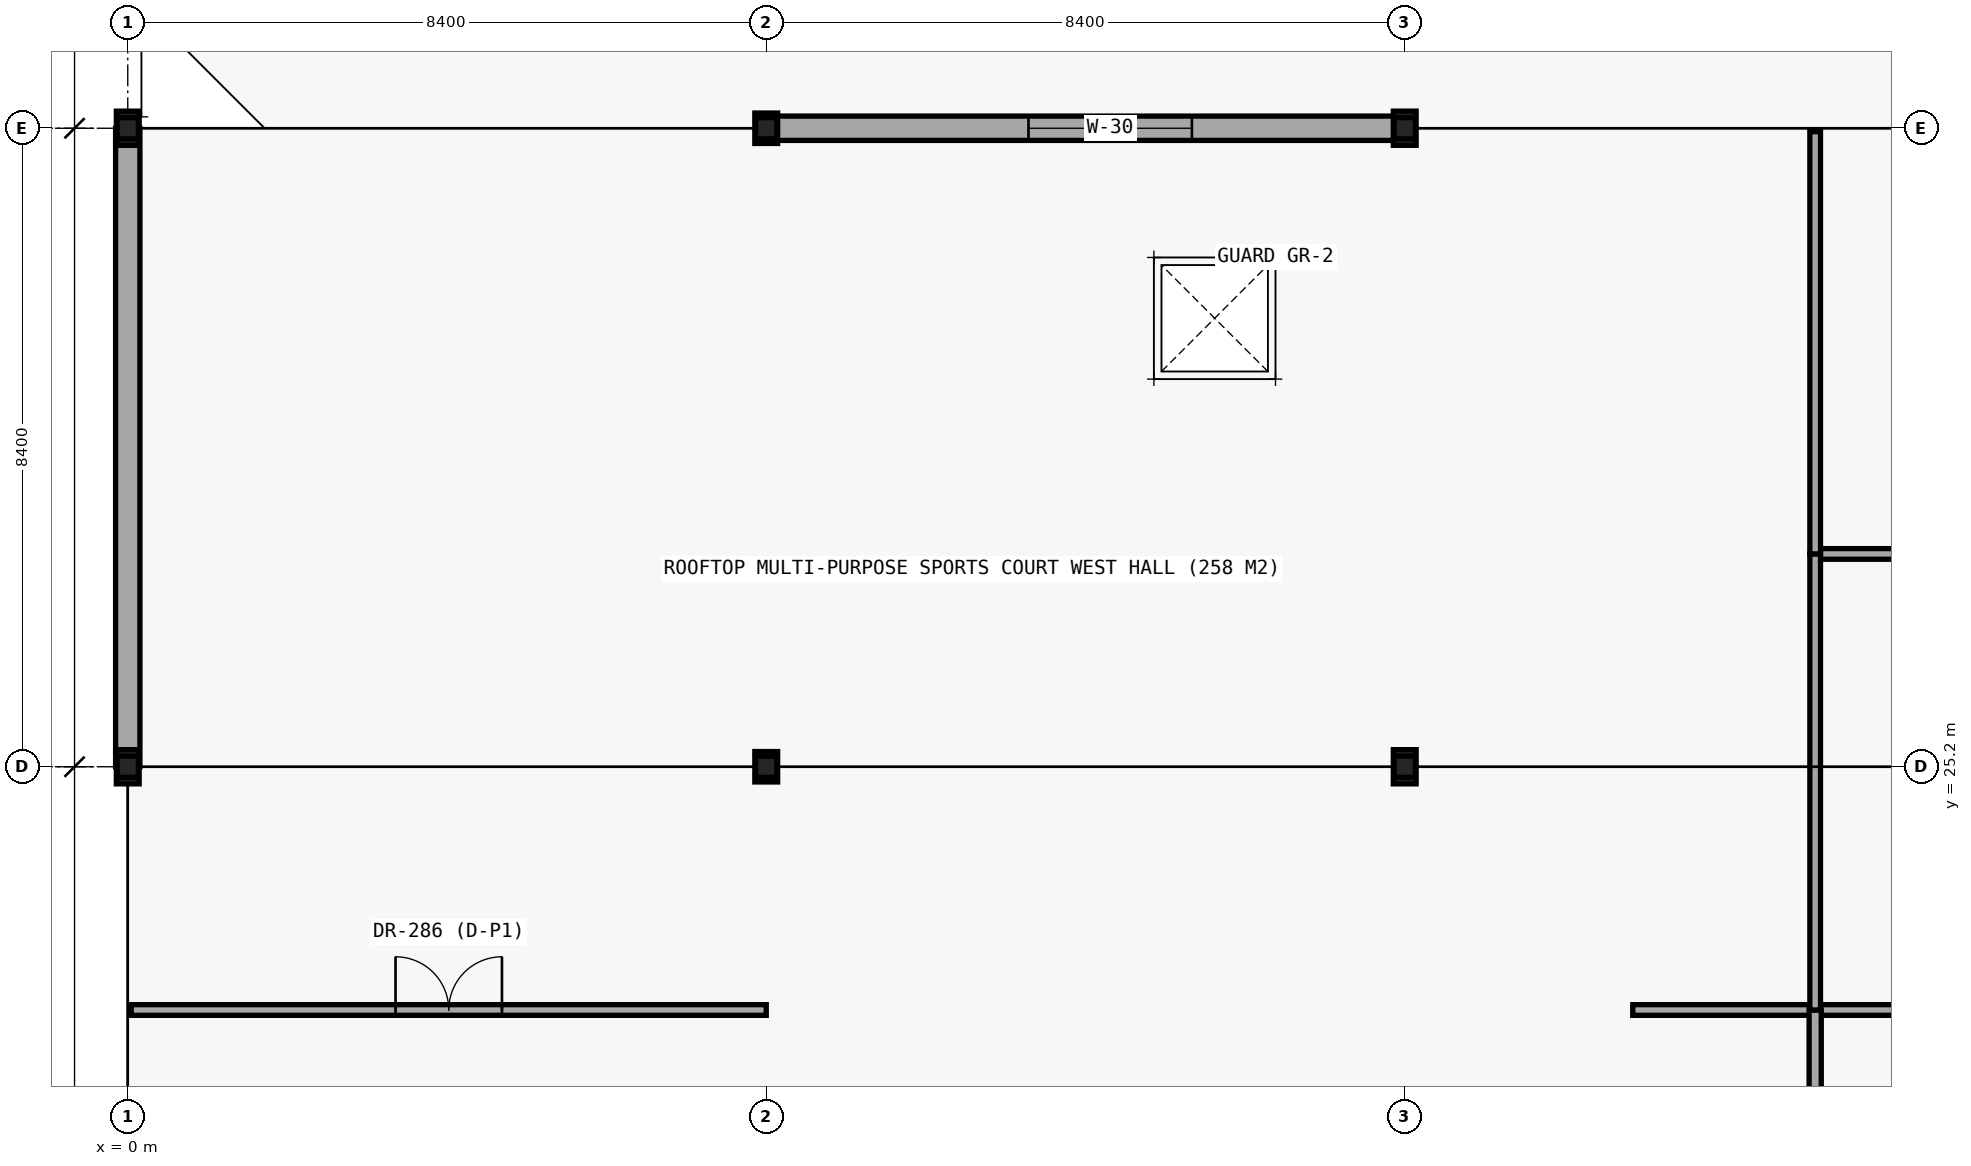
"""IFC4 building model, lengths in metres.
Left out: names, types, materials, properties, quantities, classifications, styles, units other than length and angle.
Written with IfcOpenShell. Run it as: python <this file> out.ifc"""

import sys

from ifc_helpers import new_model, si_unit, direction, frame, frame_2d, origin, origin_2d, place, context, subcontext, project, spatial, rectangle, i_section, extrude, element, fill, save


model = new_model("IFC4")
c1 = context("Model", 3, precision=1e-05, world=origin(), true_north=direction((0.0, 1.0)))
c2 = subcontext(c1, "Body", "Model", "MODEL_VIEW")
j1 = project(units=[si_unit("LENGTHUNIT", "METRE"), si_unit("PLANEANGLEUNIT", "RADIAN")], contexts=[c1])
p1 = place(None, origin())
s1 = spatial("IfcSite", under=j1, at=p1, CompositionType="ELEMENT")
p2 = place(p1, origin())
s2 = spatial("IfcBuilding", under=s1, at=p2, CompositionType="ELEMENT")
p3 = place(p2, frame((0.0, 0.0, 26.4)))
s3 = spatial("IfcBuildingStorey", under=s2, at=p3, CompositionType="ELEMENT", Elevation=26.4)
for number, where, z_axis, x_axis in (
    (1, (0.0, 25.2, 0.0), (0.0, 0.0, 1.0), (1.0, 0.0, 0.0)),
    (2, (0.0, 33.6, 0.0), (0.0, 0.0, 1.0), (1.0, 0.0, 0.0)),
):
    element("IfcColumn", number, at=place(p3, frame(where, z_axis=z_axis, x_axis=x_axis)), inside=s3, PredefinedType="COLUMN", context=c2, shape_type="SweptSolid", body=[
        extrude(i_section(OverallWidth=0.3, OverallDepth=0.45, WebThickness=0.014, FlangeThickness=0.026, FilletRadius=0.027, at=origin_2d()), origin(), (0.0, 0.0, 1.0), 4.63),
    ])
for number, where, z_axis, x_axis in (
    (3, (8.4, 25.2, 0.0), (0.0, 0.0, 1.0), (1.0, 0.0, 0.0)),
    (4, (8.4, 33.6, 0.0), (0.0, 0.0, 1.0), (1.0, 0.0, 0.0)),
):
    element("IfcColumn", number, at=place(p3, frame(where, z_axis=z_axis, x_axis=x_axis)), inside=s3, PredefinedType="COLUMN", context=c2, shape_type="SweptSolid", body=[
        extrude(i_section(OverallWidth=0.3, OverallDepth=0.4, WebThickness=0.013, FlangeThickness=0.024, FilletRadius=0.027, at=origin_2d()), origin(), (0.0, 0.0, 1.0), 4.63),
    ])
for number, where, z_axis, x_axis in (
    (5, (16.8, 25.2, 0.0), (0.0, 0.0, 1.0), (1.0, 0.0, 0.0)),
    (6, (16.8, 33.6, 0.0), (0.0, 0.0, 1.0), (1.0, 0.0, 0.0)),
):
    element("IfcColumn", number, at=place(p3, frame(where, z_axis=z_axis, x_axis=x_axis)), inside=s3, PredefinedType="COLUMN", context=c2, shape_type="SweptSolid", body=[
        extrude(i_section(OverallWidth=0.3, OverallDepth=0.45, WebThickness=0.014, FlangeThickness=0.026, FilletRadius=0.027, at=origin_2d()), origin(), (0.0, 0.0, 1.0), 4.63),
    ])
for number, where, z_axis, x_axis in (
    (7, (0.0, 25.2, 4.63), (0.0, 0.0, 1.0), (1.0, 0.0, 0.0)),
    (8, (8.4, 25.2, 4.63), (0.0, 0.0, 1.0), (1.0, 0.0, 0.0)),
    (9, (16.8, 25.2, 4.63), (0.0, 0.0, 1.0), (1.0, 0.0, 0.0)),
    (10, (0.0, 33.6, 4.63), (0.0, 0.0, 1.0), (1.0, 0.0, 0.0)),
    (11, (8.4, 33.6, 4.63), (0.0, 0.0, 1.0), (1.0, 0.0, 0.0)),
    (12, (16.8, 33.6, 4.63), (0.0, 0.0, 1.0), (1.0, 0.0, 0.0)),
):
    element("IfcColumn", number, at=place(p3, frame(where, z_axis=z_axis, x_axis=x_axis)), inside=s3, PredefinedType="COLUMN", context=c2, shape_type="SweptSolid", body=[
        extrude(i_section(OverallWidth=0.28, OverallDepth=0.28, WebThickness=0.01, FlangeThickness=0.018, FilletRadius=0.024, at=origin_2d()), origin(), (0.0, 0.0, 1.0), 2.4),
    ])
p4 = place(p3, frame((0.0, 33.6, 0.0), z_axis=(0.0, 0.0, 1.0), x_axis=(0.0, -1.0, 0.0)))
e13 = element("IfcWall", 13, at=p4, inside=s3, PredefinedType="STANDARD", context=c2, shape_type="SweptSolid", body=[
    extrude(rectangle(XDim=8.4, YDim=0.32, at=frame_2d((4.2, 0.0))), origin(), (0.0, 0.0, 1.0), 4.06),
])
p5 = place(p3, frame((16.8, 33.6, 0.0), z_axis=(0.0, 0.0, 1.0), x_axis=(-1.0, 0.0, 0.0)))
e14 = element("IfcWall", 14, at=p5, inside=s3, PredefinedType="STANDARD", context=c2, shape_type="SweptSolid", body=[
    extrude(rectangle(XDim=8.4, YDim=0.32, at=frame_2d((4.2, 0.0))), origin(), (0.0, 0.0, 1.0), 4.06),
])
p6 = place(p5, frame((2.8, 0.0, 0.85)))
e15 = element("IfcOpeningElement", 15, at=p6, cuts=e14, PredefinedType="OPENING", context=c2, shape_type="SweptSolid", body=[
    extrude(rectangle(XDim=2.15, YDim=2.3, at=frame_2d((1.075, 1.15))), frame((0.0, 0.17, 0.0), z_axis=(0.0, -1.0, 0.0), x_axis=(1.0, 0.0, 0.0)), (0.0, 0.0, 1.0), 0.34),
])
p7 = place(p3, frame((0.045, 22.0, 0.0), z_axis=(0.0, 0.0, 1.0), x_axis=(1.0, 0.0, 0.0)))
e16 = element("IfcWall", 16, at=p7, inside=s3, PredefinedType="PARTITIONING", context=c2, shape_type="SweptSolid", body=[
    extrude(rectangle(XDim=8.355, YDim=0.14, at=frame_2d((4.177, 0.0))), origin(), (0.0, 0.0, 1.0), 4.1),
])
p8 = place(p7, frame((3.478, 0.0, 0.0)))
e17 = element("IfcOpeningElement", 17, at=p8, cuts=e16, PredefinedType="OPENING", context=c2, shape_type="SweptSolid", body=[
    extrude(rectangle(XDim=1.4, YDim=2.25, at=frame_2d((0.7, 1.125))), frame((0.0, 0.08, 0.0), z_axis=(0.0, -1.0, 0.0), x_axis=(1.0, 0.0, 0.0)), (0.0, 0.0, 1.0), 0.16),
])
p9 = place(p3, frame((19.8, 22.0, 0.0), z_axis=(0.0, 0.0, 1.0), x_axis=(1.0, 0.0, 0.0)))
e18 = element("IfcWall", 18, at=p9, inside=s3, PredefinedType="PARTITIONING", context=c2, shape_type="SweptSolid", body=[
    extrude(rectangle(XDim=2.4, YDim=0.14, at=frame_2d((1.2, 0.0))), origin(), (0.0, 0.0, 1.0), 4.1),
])
p10 = place(p3, frame((22.2, 22.0, 0.0), z_axis=(0.0, 0.0, 1.0), x_axis=(1.0, 0.0, 0.0)))
e19 = element("IfcWall", 19, at=p10, inside=s3, PredefinedType="PARTITIONING", context=c2, shape_type="SweptSolid", body=[
    extrude(rectangle(XDim=11.4, YDim=0.14, at=frame_2d((5.7, 0.0))), origin(), (0.0, 0.0, 1.0), 4.1),
])
p11 = place(p10, frame((5.2, 0.0, 0.0)))
e20 = element("IfcOpeningElement", 20, at=p11, cuts=e19, PredefinedType="OPENING", context=c2, shape_type="SweptSolid", body=[
    extrude(rectangle(XDim=1.0, YDim=2.15, at=frame_2d((0.5, 1.075))), frame((0.0, 0.08, 0.0), z_axis=(0.0, -1.0, 0.0), x_axis=(1.0, 0.0, 0.0)), (0.0, 0.0, 1.0), 0.16),
])
p12 = place(p3, frame((22.2, 28.0, 0.0), z_axis=(0.0, 0.0, 1.0), x_axis=(1.0, 0.0, 0.0)))
e21 = element("IfcWall", 21, at=p12, inside=s3, PredefinedType="PARTITIONING", context=c2, shape_type="SweptSolid", body=[
    extrude(rectangle(XDim=11.4, YDim=0.14, at=frame_2d((5.7, 0.0))), origin(), (0.0, 0.0, 1.0), 4.1),
])
p13 = place(p12, frame((5.2, 0.0, 0.0)))
e22 = element("IfcOpeningElement", 22, at=p13, cuts=e21, PredefinedType="OPENING", context=c2, shape_type="SweptSolid", body=[
    extrude(rectangle(XDim=1.0, YDim=2.15, at=frame_2d((0.5, 1.075))), frame((0.0, 0.08, 0.0), z_axis=(0.0, -1.0, 0.0), x_axis=(1.0, 0.0, 0.0)), (0.0, 0.0, 1.0), 0.16),
])
p14 = place(p3, frame((22.2, 5.4, 0.0), z_axis=(0.0, 0.0, 1.0), x_axis=(0.0, 1.0, 0.0)))
e23 = element("IfcWall", 23, at=p14, inside=s3, PredefinedType="PARTITIONING", context=c2, shape_type="SweptSolid", body=[
    extrude(rectangle(XDim=16.6, YDim=0.16, at=frame_2d((8.3, 0.0))), origin(), (0.0, 0.0, 1.0), 4.1),
])
p15 = place(p14, frame((4.72, 0.0, 0.0)))
e24 = element("IfcOpeningElement", 24, at=p15, cuts=e23, PredefinedType="OPENING", context=c2, shape_type="SweptSolid", body=[
    extrude(rectangle(XDim=1.0, YDim=2.15, at=frame_2d((0.5, 1.075))), frame((0.0, 0.09, 0.0), z_axis=(0.0, -1.0, 0.0), x_axis=(1.0, 0.0, 0.0)), (0.0, 0.0, 1.0), 0.18),
])
p16 = place(p3, frame((22.2, 22.0, 0.0), z_axis=(0.0, 0.0, 1.0), x_axis=(0.0, 1.0, 0.0)))
e25 = element("IfcWall", 25, at=p16, inside=s3, PredefinedType="PARTITIONING", context=c2, shape_type="SweptSolid", body=[
    extrude(rectangle(XDim=6.0, YDim=0.14, at=frame_2d((3.0, 0.0))), origin(), (0.0, 0.0, 1.0), 4.1),
])
p17 = place(p3, frame((22.2, 28.0, 0.0), z_axis=(0.0, 0.0, 1.0), x_axis=(0.0, 1.0, 0.0)))
e26 = element("IfcWall", 26, at=p17, inside=s3, PredefinedType="PARTITIONING", context=c2, shape_type="SweptSolid", body=[
    extrude(rectangle(XDim=5.555, YDim=0.14, at=frame_2d((2.777, 0.0))), origin(), (0.0, 0.0, 1.0), 4.1),
])
p18 = place(p6, origin())
e27 = element("IfcWindow", 27, at=p18, inside=s3, PartitioningType="SINGLE_PANEL", PredefinedType="WINDOW", context=c2, shape_type="SweptSolid", body=[
    extrude(rectangle(XDim=2.15, YDim=2.3, at=frame_2d((1.075, 1.15))), frame((0.0, 0.03, 0.0), z_axis=(0.0, -1.0, 0.0), x_axis=(1.0, 0.0, 0.0)), (0.0, 0.0, 1.0), 0.06),
])
fill(e15, e27)
p19 = place(p8, origin())
e28 = element("IfcDoor", 28, at=p19, inside=s3, OperationType="DOUBLE_DOOR_SINGLE_SWING", PredefinedType="DOOR", context=c2, shape_type="SweptSolid", body=[
    extrude(rectangle(XDim=1.4, YDim=2.25, at=frame_2d((0.7, 1.125))), frame((0.0, 0.025, 0.0), z_axis=(0.0, -1.0, 0.0), x_axis=(1.0, 0.0, 0.0)), (0.0, 0.0, 1.0), 0.05),
])
fill(e17, e28)
save(model, sys.argv[1])
